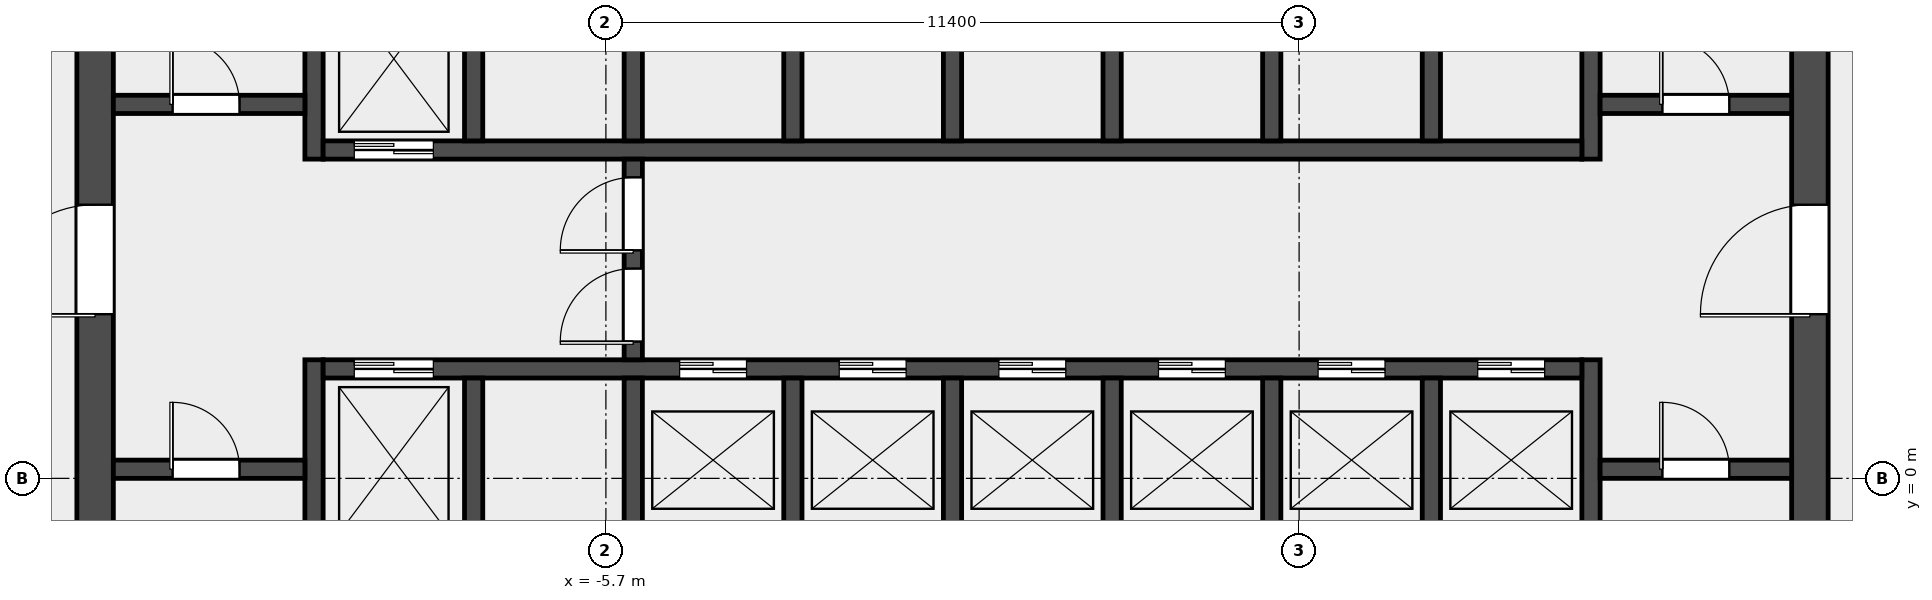
"""IFC4 building model, lengths in metres.
Left out: names, types, materials, properties, quantities, classifications, styles, units other than length and angle.
Written with IfcOpenShell. Run it as: python <this file> out.ifc"""

import sys

from ifc_helpers import new_model, si_unit, direction, frame, frame_2d, origin, place, context, subcontext, project, spatial, rectangle, extrude, element, fill, save


model = new_model("IFC4")
c1 = context("Model", 3, precision=1e-05, world=origin(), true_north=direction((0.0, 1.0)))
c2 = subcontext(c1, "Body", "Model", "MODEL_VIEW")
j1 = project(units=[si_unit("LENGTHUNIT", "METRE"), si_unit("PLANEANGLEUNIT", "RADIAN")], contexts=[c1])
p1 = place(None, origin())
s1 = spatial("IfcSite", under=j1, at=p1, CompositionType="ELEMENT")
p2 = place(p1, origin())
s2 = spatial("IfcBuilding", under=s1, at=p2, CompositionType="ELEMENT")
p3 = place(p2, frame((0.0, 0.0, 55.0)))
s3 = spatial("IfcBuildingStorey", under=s2, at=p3, CompositionType="ELEMENT", Elevation=55.0)
p4 = place(p3, frame((-14.1, -6.6, 0.0), z_axis=(0.0, 0.0, 1.0), x_axis=(0.0, 1.0, 0.0)))
e1 = element("IfcWall", 1, at=p4, inside=s3, PredefinedType="SHEAR", context=c2, shape_type="SweptSolid", body=[
    extrude(rectangle(XDim=19.5, YDim=0.6, at=frame_2d((9.75, 0.0))), origin(), (0.0, 0.0, 1.0), 4.5),
])
p5 = place(p4, frame((9.3, 0.0, 0.0)))
e2 = element("IfcOpeningElement", 2, at=p5, cuts=e1, PredefinedType="OPENING", context=c2, shape_type="SweptSolid", body=[
    extrude(rectangle(XDim=1.8, YDim=2.1, at=frame_2d((0.9, 1.05))), frame((0.0, 0.312, 0.0), z_axis=(0.0, -1.0, 0.0), x_axis=(1.0, 0.0, 0.0)), (0.0, 0.0, 1.0), 0.624),
])
p6 = place(p3, frame((14.1, -6.6, 0.0), z_axis=(0.0, 0.0, 1.0), x_axis=(0.0, 1.0, 0.0)))
e3 = element("IfcWall", 3, at=p6, inside=s3, PredefinedType="SHEAR", context=c2, shape_type="SweptSolid", body=[
    extrude(rectangle(XDim=19.5, YDim=0.6, at=frame_2d((9.75, 0.0))), origin(), (0.0, 0.0, 1.0), 4.5),
])
p7 = place(p6, frame((9.3, 0.0, 0.0)))
e4 = element("IfcOpeningElement", 4, at=p7, cuts=e3, PredefinedType="OPENING", context=c2, shape_type="SweptSolid", body=[
    extrude(rectangle(XDim=1.8, YDim=2.1, at=frame_2d((0.9, 1.05))), frame((0.0, 0.312, 0.0), z_axis=(0.0, -1.0, 0.0), x_axis=(1.0, 0.0, 0.0)), (0.0, 0.0, 1.0), 0.624),
])
p8 = place(p3, frame((-10.5, -6.6, 0.0), z_axis=(0.0, 0.0, 1.0), x_axis=(0.0, 1.0, 0.0)))
e5 = element("IfcWall", 5, at=p8, inside=s3, PredefinedType="SHEAR", context=c2, shape_type="SweptSolid", body=[
    extrude(rectangle(XDim=8.55, YDim=0.3, at=frame_2d((4.275, 0.0))), origin(), (0.0, 0.0, 1.0), 4.5),
])
p9 = place(p3, frame((-10.5, 5.25, 0.0), z_axis=(0.0, 0.0, 1.0), x_axis=(0.0, 1.0, 0.0)))
e6 = element("IfcWall", 6, at=p9, inside=s3, PredefinedType="SHEAR", context=c2, shape_type="SweptSolid", body=[
    extrude(rectangle(XDim=7.65, YDim=0.3, at=frame_2d((3.825, 0.0))), origin(), (0.0, 0.0, 1.0), 4.5),
])
p10 = place(p3, frame((10.5, -6.6, 0.0), z_axis=(0.0, 0.0, 1.0), x_axis=(0.0, 1.0, 0.0)))
e7 = element("IfcWall", 7, at=p10, inside=s3, PredefinedType="SHEAR", context=c2, shape_type="SweptSolid", body=[
    extrude(rectangle(XDim=8.55, YDim=0.3, at=frame_2d((4.275, 0.0))), origin(), (0.0, 0.0, 1.0), 4.5),
])
p11 = place(p3, frame((10.5, 5.25, 0.0), z_axis=(0.0, 0.0, 1.0), x_axis=(0.0, 1.0, 0.0)))
e8 = element("IfcWall", 8, at=p11, inside=s3, PredefinedType="SHEAR", context=c2, shape_type="SweptSolid", body=[
    extrude(rectangle(XDim=7.65, YDim=0.3, at=frame_2d((3.825, 0.0))), origin(), (0.0, 0.0, 1.0), 4.5),
])
p12 = place(p3, frame((-13.8, 0.15, 0.0), z_axis=(0.0, 0.0, 1.0), x_axis=(1.0, 0.0, 0.0)))
e9 = element("IfcWall", 9, at=p12, inside=s3, PredefinedType="SOLIDWALL", context=c2, shape_type="SweptSolid", body=[
    extrude(rectangle(XDim=3.15, YDim=0.3, at=frame_2d((1.575, 0.0))), origin(), (0.0, 0.0, 1.0), 4.5),
])
p13 = place(p12, frame((0.975, 0.0, 0.0)))
e10 = element("IfcOpeningElement", 10, at=p13, cuts=e9, PredefinedType="OPENING", context=c2, shape_type="SweptSolid", body=[
    extrude(rectangle(XDim=1.1, YDim=2.1, at=frame_2d((0.55, 1.05))), frame((0.0, 0.162, 0.0), z_axis=(0.0, -1.0, 0.0), x_axis=(1.0, 0.0, 0.0)), (0.0, 0.0, 1.0), 0.324),
])
p14 = place(p3, frame((-13.8, 6.15, 0.0), z_axis=(0.0, 0.0, 1.0), x_axis=(1.0, 0.0, 0.0)))
e11 = element("IfcWall", 11, at=p14, inside=s3, PredefinedType="SOLIDWALL", context=c2, shape_type="SweptSolid", body=[
    extrude(rectangle(XDim=3.15, YDim=0.3, at=frame_2d((1.575, 0.0))), origin(), (0.0, 0.0, 1.0), 4.5),
])
p15 = place(p14, frame((0.975, 0.0, 0.0)))
e12 = element("IfcOpeningElement", 12, at=p15, cuts=e11, PredefinedType="OPENING", context=c2, shape_type="SweptSolid", body=[
    extrude(rectangle(XDim=1.1, YDim=2.1, at=frame_2d((0.55, 1.05))), frame((0.0, 0.162, 0.0), z_axis=(0.0, -1.0, 0.0), x_axis=(1.0, 0.0, 0.0)), (0.0, 0.0, 1.0), 0.324),
])
p16 = place(p3, frame((10.65, 0.15, 0.0), z_axis=(0.0, 0.0, 1.0), x_axis=(1.0, 0.0, 0.0)))
e13 = element("IfcWall", 13, at=p16, inside=s3, PredefinedType="SOLIDWALL", context=c2, shape_type="SweptSolid", body=[
    extrude(rectangle(XDim=3.15, YDim=0.3, at=frame_2d((1.575, 0.0))), origin(), (0.0, 0.0, 1.0), 4.5),
])
p17 = place(p16, frame((1.025, 0.0, 0.0)))
e14 = element("IfcOpeningElement", 14, at=p17, cuts=e13, PredefinedType="OPENING", context=c2, shape_type="SweptSolid", body=[
    extrude(rectangle(XDim=1.1, YDim=2.1, at=frame_2d((0.55, 1.05))), frame((0.0, 0.162, 0.0), z_axis=(0.0, -1.0, 0.0), x_axis=(1.0, 0.0, 0.0)), (0.0, 0.0, 1.0), 0.324),
])
p18 = place(p3, frame((10.65, 6.15, 0.0), z_axis=(0.0, 0.0, 1.0), x_axis=(1.0, 0.0, 0.0)))
e15 = element("IfcWall", 15, at=p18, inside=s3, PredefinedType="SOLIDWALL", context=c2, shape_type="SweptSolid", body=[
    extrude(rectangle(XDim=3.15, YDim=0.3, at=frame_2d((1.575, 0.0))), origin(), (0.0, 0.0, 1.0), 4.5),
])
p19 = place(p18, frame((1.025, 0.0, 0.0)))
e16 = element("IfcOpeningElement", 16, at=p19, cuts=e15, PredefinedType="OPENING", context=c2, shape_type="SweptSolid", body=[
    extrude(rectangle(XDim=1.1, YDim=2.1, at=frame_2d((0.55, 1.05))), frame((0.0, 0.162, 0.0), z_axis=(0.0, -1.0, 0.0), x_axis=(1.0, 0.0, 0.0)), (0.0, 0.0, 1.0), 0.324),
])
p20 = place(p3, frame((-10.35, 1.8, 0.0), z_axis=(0.0, 0.0, 1.0), x_axis=(1.0, 0.0, 0.0)))
e17 = element("IfcWall", 17, at=p20, inside=s3, PredefinedType="SOLIDWALL", context=c2, shape_type="SweptSolid", body=[
    extrude(rectangle(XDim=20.7, YDim=0.3, at=frame_2d((10.35, 0.0))), origin(), (0.0, 0.0, 1.0), 4.5),
])
p21 = place(p20, frame((0.512, 0.0, 0.0)))
e18 = element("IfcOpeningElement", 18, at=p21, cuts=e17, PredefinedType="OPENING", context=c2, shape_type="SweptSolid", body=[
    extrude(rectangle(XDim=1.3, YDim=2.1, at=frame_2d((0.65, 1.05))), frame((0.0, 0.162, 0.0), z_axis=(0.0, -1.0, 0.0), x_axis=(1.0, 0.0, 0.0)), (0.0, 0.0, 1.0), 0.324),
])
p22 = place(p20, frame((5.863, 0.0, 0.0)))
e19 = element("IfcOpeningElement", 19, at=p22, cuts=e17, PredefinedType="OPENING", context=c2, shape_type="SweptSolid", body=[
    extrude(rectangle(XDim=1.1, YDim=2.1, at=frame_2d((0.55, 1.05))), frame((0.0, 0.162, 0.0), z_axis=(0.0, -1.0, 0.0), x_axis=(1.0, 0.0, 0.0)), (0.0, 0.0, 1.0), 0.324),
])
p23 = place(p20, frame((8.488, 0.0, 0.0)))
e20 = element("IfcOpeningElement", 20, at=p23, cuts=e17, PredefinedType="OPENING", context=c2, shape_type="SweptSolid", body=[
    extrude(rectangle(XDim=1.1, YDim=2.1, at=frame_2d((0.55, 1.05))), frame((0.0, 0.162, 0.0), z_axis=(0.0, -1.0, 0.0), x_axis=(1.0, 0.0, 0.0)), (0.0, 0.0, 1.0), 0.324),
])
p24 = place(p20, frame((11.113, 0.0, 0.0)))
e21 = element("IfcOpeningElement", 21, at=p24, cuts=e17, PredefinedType="OPENING", context=c2, shape_type="SweptSolid", body=[
    extrude(rectangle(XDim=1.1, YDim=2.1, at=frame_2d((0.55, 1.05))), frame((0.0, 0.162, 0.0), z_axis=(0.0, -1.0, 0.0), x_axis=(1.0, 0.0, 0.0)), (0.0, 0.0, 1.0), 0.324),
])
p25 = place(p20, frame((13.738, 0.0, 0.0)))
e22 = element("IfcOpeningElement", 22, at=p25, cuts=e17, PredefinedType="OPENING", context=c2, shape_type="SweptSolid", body=[
    extrude(rectangle(XDim=1.1, YDim=2.1, at=frame_2d((0.55, 1.05))), frame((0.0, 0.162, 0.0), z_axis=(0.0, -1.0, 0.0), x_axis=(1.0, 0.0, 0.0)), (0.0, 0.0, 1.0), 0.324),
])
p26 = place(p20, frame((16.363, 0.0, 0.0)))
e23 = element("IfcOpeningElement", 23, at=p26, cuts=e17, PredefinedType="OPENING", context=c2, shape_type="SweptSolid", body=[
    extrude(rectangle(XDim=1.1, YDim=2.1, at=frame_2d((0.55, 1.05))), frame((0.0, 0.162, 0.0), z_axis=(0.0, -1.0, 0.0), x_axis=(1.0, 0.0, 0.0)), (0.0, 0.0, 1.0), 0.324),
])
p27 = place(p20, frame((18.988, 0.0, 0.0)))
e24 = element("IfcOpeningElement", 24, at=p27, cuts=e17, PredefinedType="OPENING", context=c2, shape_type="SweptSolid", body=[
    extrude(rectangle(XDim=1.1, YDim=2.1, at=frame_2d((0.55, 1.05))), frame((0.0, 0.162, 0.0), z_axis=(0.0, -1.0, 0.0), x_axis=(1.0, 0.0, 0.0)), (0.0, 0.0, 1.0), 0.324),
])
p28 = place(p3, frame((-10.35, 5.4, 0.0), z_axis=(0.0, 0.0, 1.0), x_axis=(1.0, 0.0, 0.0)))
e25 = element("IfcWall", 25, at=p28, inside=s3, PredefinedType="SOLIDWALL", context=c2, shape_type="SweptSolid", body=[
    extrude(rectangle(XDim=20.7, YDim=0.3, at=frame_2d((10.35, 0.0))), origin(), (0.0, 0.0, 1.0), 4.5),
])
p29 = place(p28, frame((0.512, 0.0, 0.0)))
e26 = element("IfcOpeningElement", 26, at=p29, cuts=e25, PredefinedType="OPENING", context=c2, shape_type="SweptSolid", body=[
    extrude(rectangle(XDim=1.3, YDim=2.1, at=frame_2d((0.65, 1.05))), frame((0.0, 0.162, 0.0), z_axis=(0.0, -1.0, 0.0), x_axis=(1.0, 0.0, 0.0)), (0.0, 0.0, 1.0), 0.324),
])
for number, where, z_axis, x_axis in (
    (27, (-7.875, -1.05, 0.0), (0.0, 0.0, 1.0), (0.0, 1.0, 0.0)),
    (28, (-5.25, -1.05, 0.0), (0.0, 0.0, 1.0), (0.0, 1.0, 0.0)),
    (29, (-2.625, -1.05, 0.0), (0.0, 0.0, 1.0), (0.0, 1.0, 0.0)),
    (30, (0.0, -1.05, 0.0), (0.0, 0.0, 1.0), (0.0, 1.0, 0.0)),
    (31, (2.625, -1.05, 0.0), (0.0, 0.0, 1.0), (0.0, 1.0, 0.0)),
    (32, (5.25, -1.05, 0.0), (0.0, 0.0, 1.0), (0.0, 1.0, 0.0)),
    (33, (7.875, -1.05, 0.0), (0.0, 0.0, 1.0), (0.0, 1.0, 0.0)),
    (34, (-7.875, 5.55, 0.0), (0.0, 0.0, 1.0), (0.0, 1.0, 0.0)),
    (35, (-5.25, 5.55, 0.0), (0.0, 0.0, 1.0), (0.0, 1.0, 0.0)),
    (36, (-2.625, 5.55, 0.0), (0.0, 0.0, 1.0), (0.0, 1.0, 0.0)),
    (37, (0.0, 5.55, 0.0), (0.0, 0.0, 1.0), (0.0, 1.0, 0.0)),
    (38, (2.625, 5.55, 0.0), (0.0, 0.0, 1.0), (0.0, 1.0, 0.0)),
    (39, (5.25, 5.55, 0.0), (0.0, 0.0, 1.0), (0.0, 1.0, 0.0)),
    (40, (7.875, 5.55, 0.0), (0.0, 0.0, 1.0), (0.0, 1.0, 0.0)),
):
    element("IfcWall", number, at=place(p3, frame(where, z_axis=z_axis, x_axis=x_axis)), inside=s3, PredefinedType="SOLIDWALL", context=c2, shape_type="SweptSolid", body=[
        extrude(rectangle(XDim=2.7, YDim=0.3, at=frame_2d((1.35, 0.0))), origin(), (0.0, 0.0, 1.0), 4.5),
    ])
p30 = place(p3, frame((-5.25, 1.95, 0.0), z_axis=(0.0, 0.0, 1.0), x_axis=(0.0, 1.0, 0.0)))
e41 = element("IfcWall", 41, at=p30, inside=s3, PredefinedType="SOLIDWALL", context=c2, shape_type="SweptSolid", body=[
    extrude(rectangle(XDim=3.3, YDim=0.3, at=frame_2d((1.65, 0.0))), origin(), (0.0, 0.0, 1.0), 4.5),
])
p31 = place(p30, frame((0.3, 0.0, 0.0)))
e42 = element("IfcOpeningElement", 42, at=p31, cuts=e41, PredefinedType="OPENING", context=c2, shape_type="SweptSolid", body=[
    extrude(rectangle(XDim=1.2, YDim=2.1, at=frame_2d((0.6, 1.05))), frame((0.0, 0.162, 0.0), z_axis=(0.0, -1.0, 0.0), x_axis=(1.0, 0.0, 0.0)), (0.0, 0.0, 1.0), 0.324),
])
p32 = place(p30, frame((1.8, 0.0, 0.0)))
e43 = element("IfcOpeningElement", 43, at=p32, cuts=e41, PredefinedType="OPENING", context=c2, shape_type="SweptSolid", body=[
    extrude(rectangle(XDim=1.2, YDim=2.1, at=frame_2d((0.6, 1.05))), frame((0.0, 0.162, 0.0), z_axis=(0.0, -1.0, 0.0), x_axis=(1.0, 0.0, 0.0)), (0.0, 0.0, 1.0), 0.324),
])
p33 = place(p13, origin())
e44 = element("IfcDoor", 44, at=p33, inside=s3, OperationType="SINGLE_SWING_LEFT", PredefinedType="DOOR", context=c2, shape_type="SweptSolid", body=[
    extrude(rectangle(XDim=1.1, YDim=2.1, at=frame_2d((0.55, 1.05))), frame((0.0, 0.025, 0.0), z_axis=(0.0, -1.0, 0.0), x_axis=(1.0, 0.0, 0.0)), (0.0, 0.0, 1.0), 0.05),
])
fill(e10, e44)
p34 = place(p15, origin())
e45 = element("IfcDoor", 45, at=p34, inside=s3, OperationType="SINGLE_SWING_LEFT", PredefinedType="DOOR", context=c2, shape_type="SweptSolid", body=[
    extrude(rectangle(XDim=1.1, YDim=2.1, at=frame_2d((0.55, 1.05))), frame((0.0, 0.025, 0.0), z_axis=(0.0, -1.0, 0.0), x_axis=(1.0, 0.0, 0.0)), (0.0, 0.0, 1.0), 0.05),
])
fill(e12, e45)
p35 = place(p17, origin())
e46 = element("IfcDoor", 46, at=p35, inside=s3, OperationType="SINGLE_SWING_RIGHT", PredefinedType="DOOR", context=c2, shape_type="SweptSolid", body=[
    extrude(rectangle(XDim=1.1, YDim=2.1, at=frame_2d((0.55, 1.05))), frame((0.0, 0.025, 0.0), z_axis=(0.0, -1.0, 0.0), x_axis=(1.0, 0.0, 0.0)), (0.0, 0.0, 1.0), 0.05),
])
fill(e14, e46)
p36 = place(p19, origin())
e47 = element("IfcDoor", 47, at=p36, inside=s3, OperationType="SINGLE_SWING_RIGHT", PredefinedType="DOOR", context=c2, shape_type="SweptSolid", body=[
    extrude(rectangle(XDim=1.1, YDim=2.1, at=frame_2d((0.55, 1.05))), frame((0.0, 0.025, 0.0), z_axis=(0.0, -1.0, 0.0), x_axis=(1.0, 0.0, 0.0)), (0.0, 0.0, 1.0), 0.05),
])
fill(e16, e47)
p37 = place(p5, origin())
e48 = element("IfcDoor", 48, at=p37, inside=s3, OperationType="DOUBLE_DOOR_SINGLE_SWING", PredefinedType="DOOR", context=c2, shape_type="SweptSolid", body=[
    extrude(rectangle(XDim=1.8, YDim=2.1, at=frame_2d((0.9, 1.05))), frame((0.0, 0.025, 0.0), z_axis=(0.0, -1.0, 0.0), x_axis=(1.0, 0.0, 0.0)), (0.0, 0.0, 1.0), 0.05),
])
fill(e2, e48)
p38 = place(p7, origin())
e49 = element("IfcDoor", 49, at=p38, inside=s3, OperationType="DOUBLE_DOOR_SINGLE_SWING", PredefinedType="DOOR", context=c2, shape_type="SweptSolid", body=[
    extrude(rectangle(XDim=1.8, YDim=2.1, at=frame_2d((0.9, 1.05))), frame((0.0, 0.025, 0.0), z_axis=(0.0, -1.0, 0.0), x_axis=(1.0, 0.0, 0.0)), (0.0, 0.0, 1.0), 0.05),
])
fill(e4, e49)
p39 = place(p31, origin())
e50 = element("IfcDoor", 50, at=p39, inside=s3, OperationType="SINGLE_SWING_LEFT", PredefinedType="DOOR", context=c2, shape_type="SweptSolid", body=[
    extrude(rectangle(XDim=1.2, YDim=2.1, at=frame_2d((0.6, 1.05))), frame((0.0, 0.025, 0.0), z_axis=(0.0, -1.0, 0.0), x_axis=(1.0, 0.0, 0.0)), (0.0, 0.0, 1.0), 0.05),
])
fill(e42, e50)
p40 = place(p32, origin())
e51 = element("IfcDoor", 51, at=p40, inside=s3, OperationType="SINGLE_SWING_RIGHT", PredefinedType="DOOR", context=c2, shape_type="SweptSolid", body=[
    extrude(rectangle(XDim=1.2, YDim=2.1, at=frame_2d((0.6, 1.05))), frame((0.0, 0.025, 0.0), z_axis=(0.0, -1.0, 0.0), x_axis=(1.0, 0.0, 0.0)), (0.0, 0.0, 1.0), 0.05),
])
fill(e43, e51)
p41 = place(p21, origin())
e52 = element("IfcDoor", 52, at=p41, inside=s3, OperationType="DOUBLE_DOOR_SLIDING", PredefinedType="DOOR", context=c2, shape_type="SweptSolid", body=[
    extrude(rectangle(XDim=1.3, YDim=2.1, at=frame_2d((0.65, 1.05))), frame((0.0, 0.025, 0.0), z_axis=(0.0, -1.0, 0.0), x_axis=(1.0, 0.0, 0.0)), (0.0, 0.0, 1.0), 0.05),
])
fill(e18, e52)
p42 = place(p22, origin())
e53 = element("IfcDoor", 53, at=p42, inside=s3, OperationType="DOUBLE_DOOR_SLIDING", PredefinedType="DOOR", context=c2, shape_type="SweptSolid", body=[
    extrude(rectangle(XDim=1.1, YDim=2.1, at=frame_2d((0.55, 1.05))), frame((0.0, 0.025, 0.0), z_axis=(0.0, -1.0, 0.0), x_axis=(1.0, 0.0, 0.0)), (0.0, 0.0, 1.0), 0.05),
])
fill(e19, e53)
p43 = place(p23, origin())
e54 = element("IfcDoor", 54, at=p43, inside=s3, OperationType="DOUBLE_DOOR_SLIDING", PredefinedType="DOOR", context=c2, shape_type="SweptSolid", body=[
    extrude(rectangle(XDim=1.1, YDim=2.1, at=frame_2d((0.55, 1.05))), frame((0.0, 0.025, 0.0), z_axis=(0.0, -1.0, 0.0), x_axis=(1.0, 0.0, 0.0)), (0.0, 0.0, 1.0), 0.05),
])
fill(e20, e54)
p44 = place(p24, origin())
e55 = element("IfcDoor", 55, at=p44, inside=s3, OperationType="DOUBLE_DOOR_SLIDING", PredefinedType="DOOR", context=c2, shape_type="SweptSolid", body=[
    extrude(rectangle(XDim=1.1, YDim=2.1, at=frame_2d((0.55, 1.05))), frame((0.0, 0.025, 0.0), z_axis=(0.0, -1.0, 0.0), x_axis=(1.0, 0.0, 0.0)), (0.0, 0.0, 1.0), 0.05),
])
fill(e21, e55)
p45 = place(p25, origin())
e56 = element("IfcDoor", 56, at=p45, inside=s3, OperationType="DOUBLE_DOOR_SLIDING", PredefinedType="DOOR", context=c2, shape_type="SweptSolid", body=[
    extrude(rectangle(XDim=1.1, YDim=2.1, at=frame_2d((0.55, 1.05))), frame((0.0, 0.025, 0.0), z_axis=(0.0, -1.0, 0.0), x_axis=(1.0, 0.0, 0.0)), (0.0, 0.0, 1.0), 0.05),
])
fill(e22, e56)
p46 = place(p26, origin())
e57 = element("IfcDoor", 57, at=p46, inside=s3, OperationType="DOUBLE_DOOR_SLIDING", PredefinedType="DOOR", context=c2, shape_type="SweptSolid", body=[
    extrude(rectangle(XDim=1.1, YDim=2.1, at=frame_2d((0.55, 1.05))), frame((0.0, 0.025, 0.0), z_axis=(0.0, -1.0, 0.0), x_axis=(1.0, 0.0, 0.0)), (0.0, 0.0, 1.0), 0.05),
])
fill(e23, e57)
p47 = place(p27, origin())
e58 = element("IfcDoor", 58, at=p47, inside=s3, OperationType="DOUBLE_DOOR_SLIDING", PredefinedType="DOOR", context=c2, shape_type="SweptSolid", body=[
    extrude(rectangle(XDim=1.1, YDim=2.1, at=frame_2d((0.55, 1.05))), frame((0.0, 0.025, 0.0), z_axis=(0.0, -1.0, 0.0), x_axis=(1.0, 0.0, 0.0)), (0.0, 0.0, 1.0), 0.05),
])
fill(e24, e58)
p48 = place(p29, origin())
e59 = element("IfcDoor", 59, at=p48, inside=s3, OperationType="DOUBLE_DOOR_SLIDING", PredefinedType="DOOR", context=c2, shape_type="SweptSolid", body=[
    extrude(rectangle(XDim=1.3, YDim=2.1, at=frame_2d((0.65, 1.05))), frame((0.0, 0.025, 0.0), z_axis=(0.0, -1.0, 0.0), x_axis=(1.0, 0.0, 0.0)), (0.0, 0.0, 1.0), 0.05),
])
fill(e26, e59)
save(model, sys.argv[1])
